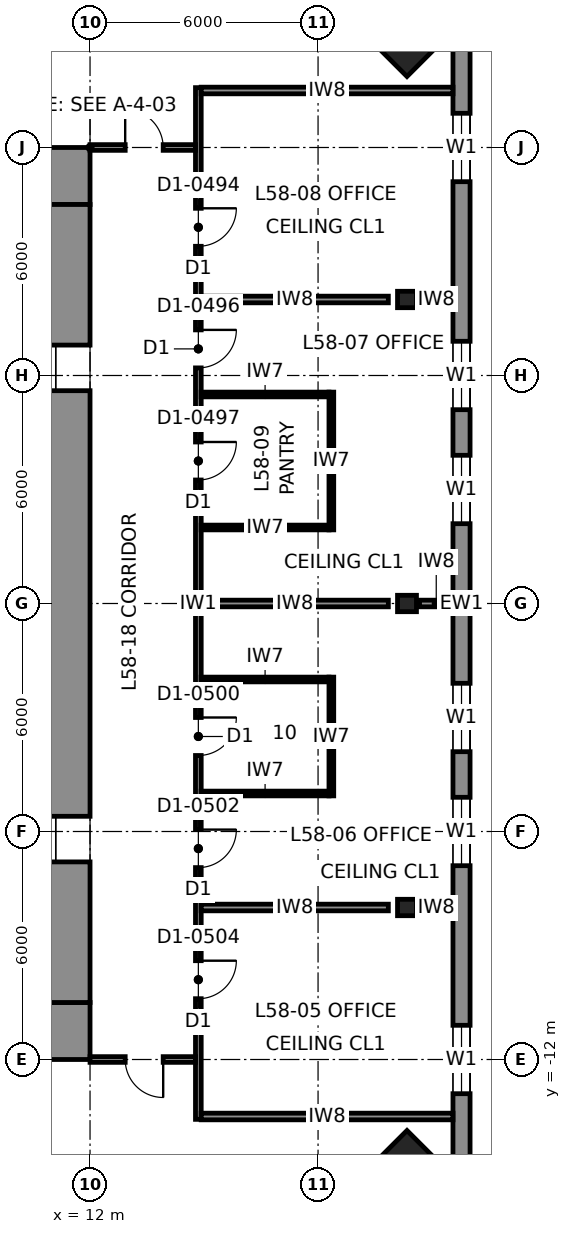
"""IFC4 building model, lengths in metres.
Left out: names, types, materials, properties, quantities, classifications, styles, units other than length and angle.
Written with IfcOpenShell. Run it as: python <this file> out.ifc"""

import sys

from ifc_helpers import new_model, si_unit, direction, frame, frame_2d, origin, origin_2d, place, context, subcontext, project, spatial, rectangle, i_section, extrude, element, fill, save


model = new_model("IFC4")
c1 = context("Model", 3, precision=1e-05, world=origin(), true_north=direction((0.0, 1.0)))
c2 = subcontext(c1, "Body", "Model", "MODEL_VIEW")
j1 = project(units=[si_unit("LENGTHUNIT", "METRE"), si_unit("PLANEANGLEUNIT", "RADIAN")], contexts=[c1])
p1 = place(None, origin())
s1 = spatial("IfcSite", under=j1, at=p1, CompositionType="ELEMENT")
p2 = place(p1, origin())
s2 = spatial("IfcBuilding", under=s1, at=p2, CompositionType="ELEMENT")
p3 = place(p2, frame((0.0, 0.0, 261.8)))
s3 = spatial("IfcBuildingStorey", under=s2, at=p3, CompositionType="ELEMENT", Elevation=261.8)
for number, where, z_axis, x_axis in (
    (1, (20.34, 15.99, 0.0), (-0.04, -0.04, 0.998), (0.707, -0.708, 0.0)),
    (2, (20.34, -15.99, 0.0), (-0.04, 0.04, 0.998), (-0.707, -0.708, 0.0)),
):
    element("IfcColumn", number, at=place(p3, frame(where, z_axis=z_axis, x_axis=x_axis)), inside=s3, PredefinedType="COLUMN", context=c2, shape_type="SweptSolid", body=[
        extrude(rectangle(XDim=3.0, YDim=3.0, at=origin_2d()), origin(), (0.0, 0.0, 1.0), 4.007),
    ])
for number, where, z_axis, x_axis in (
    (3, (20.34, 0.0, 0.0), (-0.04, 0.0, 0.999), (0.0, -1.0, 0.0)),
    (4, (20.34, -8.0, 0.0), (-0.04, 0.0, 0.999), (0.0, -1.0, 0.0)),
    (5, (20.34, 8.0, 0.0), (-0.04, 0.0, 0.999), (0.0, -1.0, 0.0)),
):
    element("IfcColumn", number, at=place(p3, frame(where, z_axis=z_axis, x_axis=x_axis)), inside=s3, PredefinedType="COLUMN", context=c2, shape_type="SweptSolid", body=[
        extrude(i_section(OverallWidth=0.432, OverallDepth=0.498, WebThickness=0.056, FlangeThickness=0.089, at=origin_2d()), origin(), (0.0, 0.0, 1.0), 4.003),
    ])
for number, where, z_axis, x_axis in (
    (6, (-12.0, 11.25, 0.0), (0.0, 0.0, 1.0), (1.0, 0.0, 0.0)),
    (7, (12.0, -11.25, 0.0), (0.0, 0.0, 1.0), (-1.0, 0.0, 0.0)),
):
    element("IfcWall", number, at=place(p3, frame(where, z_axis=z_axis, x_axis=x_axis)), inside=s3, PredefinedType="SHEAR", context=c2, shape_type="SweptSolid", body=[
        extrude(rectangle(XDim=24.0, YDim=1.5, at=frame_2d((12.0, 0.0))), origin(), (0.0, 0.0, 1.0), 4.0),
    ])
p4 = place(p3, frame((11.25, 10.5, 0.0), z_axis=(0.0, 0.0, 1.0), x_axis=(0.0, -1.0, 0.0)))
e8 = element("IfcWall", 8, at=p4, inside=s3, PredefinedType="SHEAR", context=c2, shape_type="SweptSolid", body=[
    extrude(rectangle(XDim=21.0, YDim=1.5, at=frame_2d((10.5, 0.0))), origin(), (0.0, 0.0, 1.0), 4.0),
])
p5 = place(p4, frame((3.7, 0.0, 0.0)))
e9 = element("IfcOpeningElement", 9, at=p5, cuts=e8, PredefinedType="OPENING", context=c2, shape_type="SweptSolid", body=[
    extrude(rectangle(XDim=1.2, YDim=2.3, at=frame_2d((0.6, 1.15))), frame((0.0, 0.76, 0.0), z_axis=(0.0, -1.0, 0.0), x_axis=(1.0, 0.0, 0.0)), (0.0, 0.0, 1.0), 1.52),
])
p6 = place(p4, frame((16.1, 0.0, 0.0)))
e10 = element("IfcOpeningElement", 10, at=p6, cuts=e8, PredefinedType="OPENING", context=c2, shape_type="SweptSolid", body=[
    extrude(rectangle(XDim=1.2, YDim=2.3, at=frame_2d((0.6, 1.15))), frame((0.0, 0.76, 0.0), z_axis=(0.0, -1.0, 0.0), x_axis=(1.0, 0.0, 0.0)), (0.0, 0.0, 1.0), 1.52),
])
p7 = place(p3, frame((21.775, -17.5, 0.0), z_axis=(0.0, 0.0, 1.0), x_axis=(0.0, 1.0, 0.0)))
e11 = element("IfcWall", 11, at=p7, inside=s3, PredefinedType="SOLIDWALL", context=c2, shape_type="SweptSolid", body=[
    extrude(rectangle(XDim=35.0, YDim=0.45, at=frame_2d((17.5, 0.0))), origin(), (0.0, 0.0, 1.0), 3.83),
])
p8 = place(p7, frame((4.6, 0.0, 0.7)))
e12 = element("IfcOpeningElement", 12, at=p8, cuts=e11, PredefinedType="OPENING", context=c2, shape_type="SweptSolid", body=[
    extrude(rectangle(XDim=1.8, YDim=2.6, at=frame_2d((0.9, 1.3))), frame((0.0, 0.235, 0.0), z_axis=(0.0, -1.0, 0.0), x_axis=(1.0, 0.0, 0.0)), (0.0, 0.0, 1.0), 0.47),
])
p9 = place(p7, frame((10.6, 0.0, 0.7)))
e13 = element("IfcOpeningElement", 13, at=p9, cuts=e11, PredefinedType="OPENING", context=c2, shape_type="SweptSolid", body=[
    extrude(rectangle(XDim=1.8, YDim=2.6, at=frame_2d((0.9, 1.3))), frame((0.0, 0.235, 0.0), z_axis=(0.0, -1.0, 0.0), x_axis=(1.0, 0.0, 0.0)), (0.0, 0.0, 1.0), 0.47),
])
p10 = place(p7, frame((13.6, 0.0, 0.7)))
e14 = element("IfcOpeningElement", 14, at=p10, cuts=e11, PredefinedType="OPENING", context=c2, shape_type="SweptSolid", body=[
    extrude(rectangle(XDim=1.8, YDim=2.6, at=frame_2d((0.9, 1.3))), frame((0.0, 0.235, 0.0), z_axis=(0.0, -1.0, 0.0), x_axis=(1.0, 0.0, 0.0)), (0.0, 0.0, 1.0), 0.47),
])
p11 = place(p7, frame((19.6, 0.0, 0.7)))
e15 = element("IfcOpeningElement", 15, at=p11, cuts=e11, PredefinedType="OPENING", context=c2, shape_type="SweptSolid", body=[
    extrude(rectangle(XDim=1.8, YDim=2.6, at=frame_2d((0.9, 1.3))), frame((0.0, 0.235, 0.0), z_axis=(0.0, -1.0, 0.0), x_axis=(1.0, 0.0, 0.0)), (0.0, 0.0, 1.0), 0.47),
])
p12 = place(p7, frame((22.6, 0.0, 0.7)))
e16 = element("IfcOpeningElement", 16, at=p12, cuts=e11, PredefinedType="OPENING", context=c2, shape_type="SweptSolid", body=[
    extrude(rectangle(XDim=1.8, YDim=2.6, at=frame_2d((0.9, 1.3))), frame((0.0, 0.235, 0.0), z_axis=(0.0, -1.0, 0.0), x_axis=(1.0, 0.0, 0.0)), (0.0, 0.0, 1.0), 0.47),
])
p13 = place(p7, frame((28.6, 0.0, 0.7)))
e17 = element("IfcOpeningElement", 17, at=p13, cuts=e11, PredefinedType="OPENING", context=c2, shape_type="SweptSolid", body=[
    extrude(rectangle(XDim=1.8, YDim=2.6, at=frame_2d((0.9, 1.3))), frame((0.0, 0.235, 0.0), z_axis=(0.0, -1.0, 0.0), x_axis=(1.0, 0.0, 0.0)), (0.0, 0.0, 1.0), 0.47),
])
p14 = place(p3, frame((14.85, -13.575, 0.0), z_axis=(0.0, 0.0, 1.0), x_axis=(0.0, 1.0, 0.0)))
e18 = element("IfcWall", 18, at=p14, inside=s3, PredefinedType="PARTITIONING", context=c2, shape_type="SweptSolid", body=[
    extrude(rectangle(XDim=27.15, YDim=0.15, at=frame_2d((13.575, 0.0))), origin(), (0.0, 0.0, 1.0), 3.83),
])
p15 = place(p14, frame((3.175, 0.0, 0.0)))
e19 = element("IfcOpeningElement", 19, at=p15, cuts=e18, PredefinedType="OPENING", context=c2, shape_type="SweptSolid", body=[
    extrude(rectangle(XDim=1.0, YDim=2.3, at=frame_2d((0.5, 1.15))), frame((0.0, 0.085, 0.0), z_axis=(0.0, -1.0, 0.0), x_axis=(1.0, 0.0, 0.0)), (0.0, 0.0, 1.0), 0.17),
])
p16 = place(p14, frame((6.625, 0.0, 0.0)))
e20 = element("IfcOpeningElement", 20, at=p16, cuts=e18, PredefinedType="OPENING", context=c2, shape_type="SweptSolid", body=[
    extrude(rectangle(XDim=1.0, YDim=2.3, at=frame_2d((0.5, 1.15))), frame((0.0, 0.085, 0.0), z_axis=(0.0, -1.0, 0.0), x_axis=(1.0, 0.0, 0.0)), (0.0, 0.0, 1.0), 0.17),
])
p17 = place(p14, frame((19.775, 0.0, 0.0)))
e21 = element("IfcOpeningElement", 21, at=p17, cuts=e18, PredefinedType="OPENING", context=c2, shape_type="SweptSolid", body=[
    extrude(rectangle(XDim=1.0, YDim=2.3, at=frame_2d((0.5, 1.15))), frame((0.0, 0.085, 0.0), z_axis=(0.0, -1.0, 0.0), x_axis=(1.0, 0.0, 0.0)), (0.0, 0.0, 1.0), 0.17),
])
p18 = place(p14, frame((22.975, 0.0, 0.0)))
e22 = element("IfcOpeningElement", 22, at=p18, cuts=e18, PredefinedType="OPENING", context=c2, shape_type="SweptSolid", body=[
    extrude(rectangle(XDim=1.0, YDim=2.3, at=frame_2d((0.5, 1.15))), frame((0.0, 0.085, 0.0), z_axis=(0.0, -1.0, 0.0), x_axis=(1.0, 0.0, 0.0)), (0.0, 0.0, 1.0), 0.17),
])
p19 = place(p14, frame((16.825, 0.0, 0.0)))
e23 = element("IfcOpeningElement", 23, at=p19, cuts=e18, PredefinedType="OPENING", context=c2, shape_type="SweptSolid", body=[
    extrude(rectangle(XDim=1.0, YDim=2.3, at=frame_2d((0.5, 1.15))), frame((0.0, 0.085, 0.0), z_axis=(0.0, -1.0, 0.0), x_axis=(1.0, 0.0, 0.0)), (0.0, 0.0, 1.0), 0.17),
])
p20 = place(p14, frame((9.575, 0.0, 0.0)))
e24 = element("IfcOpeningElement", 24, at=p20, cuts=e18, PredefinedType="OPENING", context=c2, shape_type="SweptSolid", body=[
    extrude(rectangle(XDim=1.0, YDim=2.3, at=frame_2d((0.5, 1.15))), frame((0.0, 0.085, 0.0), z_axis=(0.0, -1.0, 0.0), x_axis=(1.0, 0.0, 0.0)), (0.0, 0.0, 1.0), 0.17),
])
p21 = place(p3, frame((12.0, 12.0, 0.0), z_axis=(0.0, 0.0, 1.0), x_axis=(1.0, 0.0, 0.0)))
e25 = element("IfcWall", 25, at=p21, inside=s3, PredefinedType="PARTITIONING", context=c2, shape_type="SweptSolid", body=[
    extrude(rectangle(XDim=2.775, YDim=0.15, at=frame_2d((1.387, 0.0))), origin(), (0.0, 0.0, 1.0), 3.83),
])
p22 = place(p21, frame((0.925, 0.0, 0.0)))
e26 = element("IfcOpeningElement", 26, at=p22, cuts=e25, PredefinedType="OPENING", context=c2, shape_type="SweptSolid", body=[
    extrude(rectangle(XDim=1.0, YDim=2.3, at=frame_2d((0.5, 1.15))), frame((0.0, 0.085, 0.0), z_axis=(0.0, -1.0, 0.0), x_axis=(1.0, 0.0, 0.0)), (0.0, 0.0, 1.0), 0.17),
])
p23 = place(p3, frame((14.775, -12.0, 0.0), z_axis=(0.0, 0.0, 1.0), x_axis=(-1.0, 0.0, 0.0)))
e27 = element("IfcWall", 27, at=p23, inside=s3, PredefinedType="PARTITIONING", context=c2, shape_type="SweptSolid", body=[
    extrude(rectangle(XDim=2.775, YDim=0.15, at=frame_2d((1.387, 0.0))), origin(), (0.0, 0.0, 1.0), 3.83),
])
p24 = place(p23, frame((0.85, 0.0, 0.0)))
e28 = element("IfcOpeningElement", 28, at=p24, cuts=e27, PredefinedType="OPENING", context=c2, shape_type="SweptSolid", body=[
    extrude(rectangle(XDim=1.0, YDim=2.3, at=frame_2d((0.5, 1.15))), frame((0.0, 0.085, 0.0), z_axis=(0.0, -1.0, 0.0), x_axis=(1.0, 0.0, 0.0)), (0.0, 0.0, 1.0), 0.17),
])
for number, where, z_axis, x_axis in (
    (29, (14.925, 13.5, 0.0), (0.0, 0.0, 1.0), (1.0, 0.0, 0.0)),
    (30, (21.55, -13.5, 0.0), (0.0, 0.0, 1.0), (-1.0, 0.0, 0.0)),
):
    element("IfcWall", number, at=place(p3, frame(where, z_axis=z_axis, x_axis=x_axis)), inside=s3, PredefinedType="PARTITIONING", context=c2, shape_type="SweptSolid", body=[
        extrude(rectangle(XDim=6.625, YDim=0.175, at=frame_2d((3.312, 0.0))), origin(), (0.0, 0.0, 1.0), 3.83),
    ])
p25 = place(p3, frame((14.925, -8.0, 0.0), z_axis=(0.0, 0.0, 1.0), x_axis=(1.0, 0.0, 0.0)))
e31 = element("IfcWall", 31, at=p25, inside=s3, PredefinedType="PARTITIONING", context=c2, shape_type="SweptSolid", body=[
    extrude(rectangle(XDim=4.924, YDim=0.175, at=frame_2d((2.462, 0.0))), origin(), (0.0, 0.0, 1.0), 3.14),
])
p26 = place(p3, frame((20.67, -8.0, 0.0), z_axis=(0.0, 0.0, 1.0), x_axis=(1.0, 0.0, 0.0)))
e32 = element("IfcWall", 32, at=p26, inside=s3, PredefinedType="PARTITIONING", context=c2, shape_type="SweptSolid", body=[
    extrude(rectangle(XDim=0.88, YDim=0.175, at=frame_2d((0.44, 0.0))), origin(), (0.0, 0.0, 1.0), 3.83),
])
p27 = place(p3, frame((14.925, 0.0, 0.0), z_axis=(0.0, 0.0, 1.0), x_axis=(1.0, 0.0, 0.0)))
e33 = element("IfcWall", 33, at=p27, inside=s3, PredefinedType="PARTITIONING", context=c2, shape_type="SweptSolid", body=[
    extrude(rectangle(XDim=4.924, YDim=0.175, at=frame_2d((2.462, 0.0))), origin(), (0.0, 0.0, 1.0), 3.14),
])
p28 = place(p3, frame((20.67, 0.0, 0.0), z_axis=(0.0, 0.0, 1.0), x_axis=(1.0, 0.0, 0.0)))
e34 = element("IfcWall", 34, at=p28, inside=s3, PredefinedType="PARTITIONING", context=c2, shape_type="SweptSolid", body=[
    extrude(rectangle(XDim=0.88, YDim=0.175, at=frame_2d((0.44, 0.0))), origin(), (0.0, 0.0, 1.0), 3.83),
])
p29 = place(p3, frame((14.925, 8.0, 0.0), z_axis=(0.0, 0.0, 1.0), x_axis=(1.0, 0.0, 0.0)))
e35 = element("IfcWall", 35, at=p29, inside=s3, PredefinedType="PARTITIONING", context=c2, shape_type="SweptSolid", body=[
    extrude(rectangle(XDim=4.924, YDim=0.175, at=frame_2d((2.462, 0.0))), origin(), (0.0, 0.0, 1.0), 3.14),
])
p30 = place(p3, frame((20.67, 8.0, 0.0), z_axis=(0.0, 0.0, 1.0), x_axis=(1.0, 0.0, 0.0)))
e36 = element("IfcWall", 36, at=p30, inside=s3, PredefinedType="PARTITIONING", context=c2, shape_type="SweptSolid", body=[
    extrude(rectangle(XDim=0.88, YDim=0.175, at=frame_2d((0.44, 0.0))), origin(), (0.0, 0.0, 1.0), 3.83),
])
p31 = place(p3, frame((18.35, 1.938, 0.0), z_axis=(0.0, 0.0, 1.0), x_axis=(0.0, 1.0, 0.0)))
e37 = element("IfcWall", 37, at=p31, inside=s3, PredefinedType="PARTITIONING", context=c2, shape_type="SweptSolid", body=[
    extrude(rectangle(XDim=3.625, YDim=0.125, at=frame_2d((1.812, 0.0))), origin(), (0.0, 0.0, 1.0), 3.83),
])
for number, where, z_axis, x_axis in (
    (38, (14.925, 2.0, 0.0), (0.0, 0.0, 1.0), (1.0, 0.0, 0.0)),
    (39, (14.925, 5.5, 0.0), (0.0, 0.0, 1.0), (1.0, 0.0, 0.0)),
):
    element("IfcWall", number, at=place(p3, frame(where, z_axis=z_axis, x_axis=x_axis)), inside=s3, PredefinedType="PARTITIONING", context=c2, shape_type="SweptSolid", body=[
        extrude(rectangle(XDim=3.363, YDim=0.125, at=frame_2d((1.681, 0.0))), origin(), (0.0, 0.0, 1.0), 3.83),
    ])
p32 = place(p3, frame((18.35, -5.062, 0.0), z_axis=(0.0, 0.0, 1.0), x_axis=(0.0, 1.0, 0.0)))
e40 = element("IfcWall", 40, at=p32, inside=s3, PredefinedType="PARTITIONING", context=c2, shape_type="SweptSolid", body=[
    extrude(rectangle(XDim=3.125, YDim=0.125, at=frame_2d((1.562, 0.0))), origin(), (0.0, 0.0, 1.0), 3.83),
])
for number, where, z_axis, x_axis in (
    (41, (14.925, -5.0, 0.0), (0.0, 0.0, 1.0), (1.0, 0.0, 0.0)),
    (42, (14.925, -2.0, 0.0), (0.0, 0.0, 1.0), (1.0, 0.0, 0.0)),
):
    element("IfcWall", number, at=place(p3, frame(where, z_axis=z_axis, x_axis=x_axis)), inside=s3, PredefinedType="PARTITIONING", context=c2, shape_type="SweptSolid", body=[
        extrude(rectangle(XDim=3.363, YDim=0.125, at=frame_2d((1.681, 0.0))), origin(), (0.0, 0.0, 1.0), 3.83),
    ])
p33 = place(p8, origin())
e43 = element("IfcWindow", 43, at=p33, inside=s3, PartitioningType="SINGLE_PANEL", PredefinedType="WINDOW", context=c2, shape_type="SweptSolid", body=[
    extrude(rectangle(XDim=1.8, YDim=2.6, at=frame_2d((0.9, 1.3))), frame((0.0, 0.03, 0.0), z_axis=(0.0, -1.0, 0.0), x_axis=(1.0, 0.0, 0.0)), (0.0, 0.0, 1.0), 0.06),
])
fill(e12, e43)
p34 = place(p9, origin())
e44 = element("IfcWindow", 44, at=p34, inside=s3, PartitioningType="SINGLE_PANEL", PredefinedType="WINDOW", context=c2, shape_type="SweptSolid", body=[
    extrude(rectangle(XDim=1.8, YDim=2.6, at=frame_2d((0.9, 1.3))), frame((0.0, 0.03, 0.0), z_axis=(0.0, -1.0, 0.0), x_axis=(1.0, 0.0, 0.0)), (0.0, 0.0, 1.0), 0.06),
])
fill(e13, e44)
p35 = place(p10, origin())
e45 = element("IfcWindow", 45, at=p35, inside=s3, PartitioningType="SINGLE_PANEL", PredefinedType="WINDOW", context=c2, shape_type="SweptSolid", body=[
    extrude(rectangle(XDim=1.8, YDim=2.6, at=frame_2d((0.9, 1.3))), frame((0.0, 0.03, 0.0), z_axis=(0.0, -1.0, 0.0), x_axis=(1.0, 0.0, 0.0)), (0.0, 0.0, 1.0), 0.06),
])
fill(e14, e45)
p36 = place(p11, origin())
e46 = element("IfcWindow", 46, at=p36, inside=s3, PartitioningType="SINGLE_PANEL", PredefinedType="WINDOW", context=c2, shape_type="SweptSolid", body=[
    extrude(rectangle(XDim=1.8, YDim=2.6, at=frame_2d((0.9, 1.3))), frame((0.0, 0.03, 0.0), z_axis=(0.0, -1.0, 0.0), x_axis=(1.0, 0.0, 0.0)), (0.0, 0.0, 1.0), 0.06),
])
fill(e15, e46)
p37 = place(p12, origin())
e47 = element("IfcWindow", 47, at=p37, inside=s3, PartitioningType="SINGLE_PANEL", PredefinedType="WINDOW", context=c2, shape_type="SweptSolid", body=[
    extrude(rectangle(XDim=1.8, YDim=2.6, at=frame_2d((0.9, 1.3))), frame((0.0, 0.03, 0.0), z_axis=(0.0, -1.0, 0.0), x_axis=(1.0, 0.0, 0.0)), (0.0, 0.0, 1.0), 0.06),
])
fill(e16, e47)
p38 = place(p13, origin())
e48 = element("IfcWindow", 48, at=p38, inside=s3, PartitioningType="SINGLE_PANEL", PredefinedType="WINDOW", context=c2, shape_type="SweptSolid", body=[
    extrude(rectangle(XDim=1.8, YDim=2.6, at=frame_2d((0.9, 1.3))), frame((0.0, 0.03, 0.0), z_axis=(0.0, -1.0, 0.0), x_axis=(1.0, 0.0, 0.0)), (0.0, 0.0, 1.0), 0.06),
])
fill(e17, e48)
p39 = place(p22, origin())
e49 = element("IfcDoor", 49, at=p39, inside=s3, OperationType="SINGLE_SWING_LEFT", PredefinedType="DOOR", context=c2, shape_type="SweptSolid", body=[
    extrude(rectangle(XDim=1.0, YDim=2.3, at=frame_2d((0.5, 1.15))), frame((0.0, 0.025, 0.0), z_axis=(0.0, -1.0, 0.0), x_axis=(1.0, 0.0, 0.0)), (0.0, 0.0, 1.0), 0.05),
])
fill(e26, e49)
p40 = place(p24, origin())
e50 = element("IfcDoor", 50, at=p40, inside=s3, OperationType="SINGLE_SWING_LEFT", PredefinedType="DOOR", context=c2, shape_type="SweptSolid", body=[
    extrude(rectangle(XDim=1.0, YDim=2.3, at=frame_2d((0.5, 1.15))), frame((0.0, 0.025, 0.0), z_axis=(0.0, -1.0, 0.0), x_axis=(1.0, 0.0, 0.0)), (0.0, 0.0, 1.0), 0.05),
])
fill(e28, e50)
p41 = place(p15, frame((1.0, 0.0, 0.0), z_axis=(0.0, 0.0, 1.0), x_axis=(-1.0, 0.0, 0.0)))
e51 = element("IfcDoor", 51, at=p41, inside=s3, OperationType="SINGLE_SWING_LEFT", PredefinedType="DOOR", context=c2, shape_type="SweptSolid", body=[
    extrude(rectangle(XDim=1.0, YDim=2.3, at=frame_2d((0.5, 1.15))), frame((0.0, 0.025, 0.0), z_axis=(0.0, -1.0, 0.0), x_axis=(1.0, 0.0, 0.0)), (0.0, 0.0, 1.0), 0.05),
])
fill(e19, e51)
p42 = place(p16, frame((1.0, 0.0, 0.0), z_axis=(0.0, 0.0, 1.0), x_axis=(-1.0, 0.0, 0.0)))
e52 = element("IfcDoor", 52, at=p42, inside=s3, OperationType="SINGLE_SWING_LEFT", PredefinedType="DOOR", context=c2, shape_type="SweptSolid", body=[
    extrude(rectangle(XDim=1.0, YDim=2.3, at=frame_2d((0.5, 1.15))), frame((0.0, 0.025, 0.0), z_axis=(0.0, -1.0, 0.0), x_axis=(1.0, 0.0, 0.0)), (0.0, 0.0, 1.0), 0.05),
])
fill(e20, e52)
p43 = place(p17, frame((1.0, 0.0, 0.0), z_axis=(0.0, 0.0, 1.0), x_axis=(-1.0, 0.0, 0.0)))
e53 = element("IfcDoor", 53, at=p43, inside=s3, OperationType="SINGLE_SWING_LEFT", PredefinedType="DOOR", context=c2, shape_type="SweptSolid", body=[
    extrude(rectangle(XDim=1.0, YDim=2.3, at=frame_2d((0.5, 1.15))), frame((0.0, 0.025, 0.0), z_axis=(0.0, -1.0, 0.0), x_axis=(1.0, 0.0, 0.0)), (0.0, 0.0, 1.0), 0.05),
])
fill(e21, e53)
p44 = place(p18, frame((1.0, 0.0, 0.0), z_axis=(0.0, 0.0, 1.0), x_axis=(-1.0, 0.0, 0.0)))
e54 = element("IfcDoor", 54, at=p44, inside=s3, OperationType="SINGLE_SWING_LEFT", PredefinedType="DOOR", context=c2, shape_type="SweptSolid", body=[
    extrude(rectangle(XDim=1.0, YDim=2.3, at=frame_2d((0.5, 1.15))), frame((0.0, 0.025, 0.0), z_axis=(0.0, -1.0, 0.0), x_axis=(1.0, 0.0, 0.0)), (0.0, 0.0, 1.0), 0.05),
])
fill(e22, e54)
p45 = place(p19, frame((1.0, 0.0, 0.0), z_axis=(0.0, 0.0, 1.0), x_axis=(-1.0, 0.0, 0.0)))
e55 = element("IfcDoor", 55, at=p45, inside=s3, OperationType="SINGLE_SWING_LEFT", PredefinedType="DOOR", context=c2, shape_type="SweptSolid", body=[
    extrude(rectangle(XDim=1.0, YDim=2.3, at=frame_2d((0.5, 1.15))), frame((0.0, 0.025, 0.0), z_axis=(0.0, -1.0, 0.0), x_axis=(1.0, 0.0, 0.0)), (0.0, 0.0, 1.0), 0.05),
])
fill(e23, e55)
p46 = place(p20, frame((1.0, 0.0, 0.0), z_axis=(0.0, 0.0, 1.0), x_axis=(-1.0, 0.0, 0.0)))
e56 = element("IfcDoor", 56, at=p46, inside=s3, OperationType="SINGLE_SWING_LEFT", PredefinedType="DOOR", context=c2, shape_type="SweptSolid", body=[
    extrude(rectangle(XDim=1.0, YDim=2.3, at=frame_2d((0.5, 1.15))), frame((0.0, 0.025, 0.0), z_axis=(0.0, -1.0, 0.0), x_axis=(1.0, 0.0, 0.0)), (0.0, 0.0, 1.0), 0.05),
])
fill(e24, e56)
p47 = place(p5, frame((1.2, 0.0, 0.0), z_axis=(0.0, 0.0, 1.0), x_axis=(-1.0, 0.0, 0.0)))
e57 = element("IfcDoor", 57, at=p47, inside=s3, OperationType="SINGLE_SWING_LEFT", PredefinedType="DOOR", context=c2, shape_type="SweptSolid", body=[
    extrude(rectangle(XDim=1.2, YDim=2.3, at=frame_2d((0.6, 1.15))), frame((0.0, 0.025, 0.0), z_axis=(0.0, -1.0, 0.0), x_axis=(1.0, 0.0, 0.0)), (0.0, 0.0, 1.0), 0.05),
])
fill(e9, e57)
p48 = place(p6, frame((1.2, 0.0, 0.0), z_axis=(0.0, 0.0, 1.0), x_axis=(-1.0, 0.0, 0.0)))
e58 = element("IfcDoor", 58, at=p48, inside=s3, OperationType="SINGLE_SWING_LEFT", PredefinedType="DOOR", context=c2, shape_type="SweptSolid", body=[
    extrude(rectangle(XDim=1.2, YDim=2.3, at=frame_2d((0.6, 1.15))), frame((0.0, 0.025, 0.0), z_axis=(0.0, -1.0, 0.0), x_axis=(1.0, 0.0, 0.0)), (0.0, 0.0, 1.0), 0.05),
])
fill(e10, e58)
save(model, sys.argv[1])
